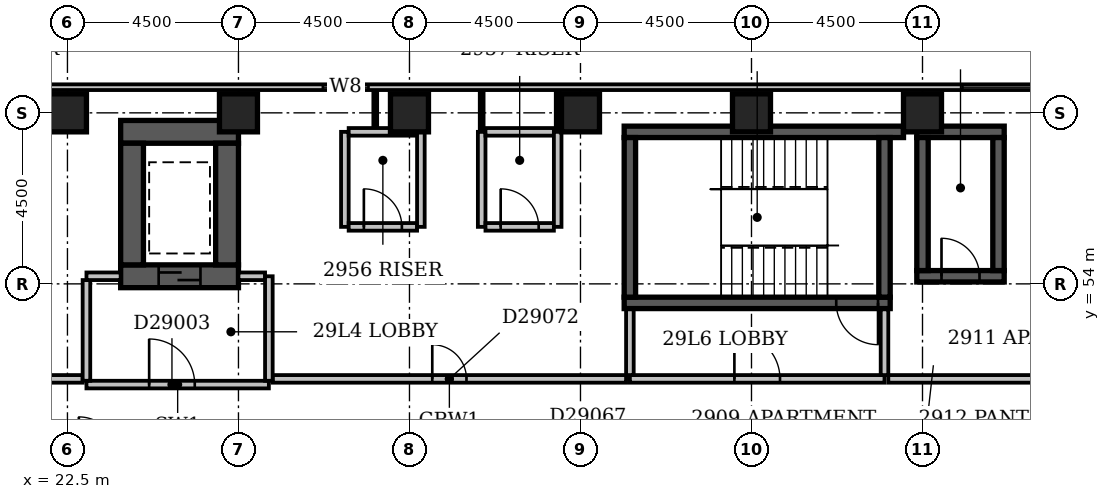
"""IFC4 building model, lengths in metres.
Left out: names, types, materials, properties, quantities, classifications, styles, units other than length and angle.
Written with IfcOpenShell. Run it as: python <this file> out.ifc"""

import sys

from ifc_helpers import new_model, si_unit, direction, frame, frame_2d, origin, origin_2d, place, context, subcontext, project, spatial, rectangle, extrude, element, fill, save


model = new_model("IFC4")
c1 = context("Model", 3, precision=1e-05, world=origin(), true_north=direction((0.0, 1.0)))
c2 = subcontext(c1, "Body", "Model", "MODEL_VIEW")
j1 = project(units=[si_unit("LENGTHUNIT", "METRE"), si_unit("PLANEANGLEUNIT", "RADIAN")], contexts=[c1])
p1 = place(None, origin())
s1 = spatial("IfcSite", under=j1, at=p1, CompositionType="ELEMENT")
p2 = place(p1, origin())
s2 = spatial("IfcBuilding", under=s1, at=p2, CompositionType="ELEMENT")
p3 = place(p2, frame((0.0, 0.0, 119.6)))
s3 = spatial("IfcBuildingStorey", under=s2, at=p3, CompositionType="ELEMENT", Elevation=119.6)
p4 = place(p3, frame((23.9, 54.2, -0.3), z_axis=(0.0, 0.0, 1.0), x_axis=(1.0, 0.0, 0.0)))
e1 = element("IfcWall", 1, at=p4, inside=s3, PredefinedType="SHEAR", context=c2, shape_type="SweptSolid", body=[
    extrude(rectangle(XDim=3.1, YDim=0.6, at=frame_2d((1.55, 0.0))), origin(), (0.0, 0.0, 1.0), 3.6),
])
p5 = place(p4, frame((1.0, 0.0, 0.3)))
e2 = element("IfcOpeningElement", 2, at=p5, cuts=e1, PredefinedType="OPENING", context=c2, shape_type="SweptSolid", body=[
    extrude(rectangle(XDim=1.1, YDim=2.1, at=frame_2d((0.55, 1.05))), frame((0.0, 0.312, 0.0), z_axis=(0.0, -1.0, 0.0), x_axis=(1.0, 0.0, 0.0)), (0.0, 0.0, 1.0), 0.624),
])
p6 = place(p3, frame((23.9, 58.0, -0.3), z_axis=(0.0, 0.0, 1.0), x_axis=(1.0, 0.0, 0.0)))
e3 = element("IfcWall", 3, at=p6, inside=s3, PredefinedType="SHEAR", context=c2, shape_type="SweptSolid", body=[
    extrude(rectangle(XDim=3.1, YDim=0.6, at=frame_2d((1.55, 0.0))), origin(), (0.0, 0.0, 1.0), 3.6),
])
for number, where, z_axis, x_axis in (
    (4, (24.2, 54.5, -0.3), (0.0, 0.0, 1.0), (0.0, 1.0, 0.0)),
    (5, (26.7, 54.5, -0.3), (0.0, 0.0, 1.0), (0.0, 1.0, 0.0)),
):
    element("IfcWall", number, at=place(p3, frame(where, z_axis=z_axis, x_axis=x_axis)), inside=s3, PredefinedType="SHEAR", context=c2, shape_type="SweptSolid", body=[
        extrude(rectangle(XDim=3.2, YDim=0.6, at=frame_2d((1.6, 0.0))), origin(), (0.0, 0.0, 1.0), 3.6),
    ])
p7 = place(p3, frame((37.15, 53.5, -0.3), z_axis=(0.0, 0.0, 1.0), x_axis=(1.0, 0.0, 0.0)))
e6 = element("IfcWall", 6, at=p7, inside=s3, PredefinedType="SHEAR", context=c2, shape_type="SweptSolid", body=[
    extrude(rectangle(XDim=7.0, YDim=0.3, at=frame_2d((3.5, 0.0))), origin(), (0.0, 0.0, 1.0), 3.6),
])
p8 = place(p7, frame((5.58, 0.0, 0.3)))
e7 = element("IfcOpeningElement", 7, at=p8, cuts=e6, PredefinedType="OPENING", context=c2, shape_type="SweptSolid", body=[
    extrude(rectangle(XDim=1.1, YDim=2.1, at=frame_2d((0.55, 1.05))), frame((0.0, 0.162, 0.0), z_axis=(0.0, -1.0, 0.0), x_axis=(1.0, 0.0, 0.0)), (0.0, 0.0, 1.0), 0.324),
])
p9 = place(p3, frame((37.15, 58.0, -0.3), z_axis=(0.0, 0.0, 1.0), x_axis=(1.0, 0.0, 0.0)))
e8 = element("IfcWall", 8, at=p9, inside=s3, PredefinedType="SHEAR", context=c2, shape_type="SweptSolid", body=[
    extrude(rectangle(XDim=7.35, YDim=0.3, at=frame_2d((3.675, 0.0))), origin(), (0.0, 0.0, 1.0), 3.6),
])
for number, where, z_axis, x_axis in (
    (9, (37.3, 53.65, -0.3), (0.0, 0.0, 1.0), (0.0, 1.0, 0.0)),
    (10, (44.0, 53.65, -0.3), (0.0, 0.0, 1.0), (0.0, 1.0, 0.0)),
):
    element("IfcWall", number, at=place(p3, frame(where, z_axis=z_axis, x_axis=x_axis)), inside=s3, PredefinedType="SHEAR", context=c2, shape_type="SweptSolid", body=[
        extrude(rectangle(XDim=4.2, YDim=0.3, at=frame_2d((2.1, 0.0))), origin(), (0.0, 0.0, 1.0), 3.6),
    ])
p10 = place(p3, frame((44.85, 54.2, -0.3), z_axis=(0.0, 0.0, 1.0), x_axis=(1.0, 0.0, 0.0)))
e11 = element("IfcWall", 11, at=p10, inside=s3, PredefinedType="SHEAR", context=c2, shape_type="SweptSolid", body=[
    extrude(rectangle(XDim=2.3, YDim=0.3, at=frame_2d((1.15, 0.0))), origin(), (0.0, 0.0, 1.0), 3.6),
])
p11 = place(p10, frame((0.65, 0.0, 0.3)))
e12 = element("IfcOpeningElement", 12, at=p11, cuts=e11, PredefinedType="OPENING", context=c2, shape_type="SweptSolid", body=[
    extrude(rectangle(XDim=1.0, YDim=2.1, at=frame_2d((0.5, 1.05))), frame((0.0, 0.162, 0.0), z_axis=(0.0, -1.0, 0.0), x_axis=(1.0, 0.0, 0.0)), (0.0, 0.0, 1.0), 0.324),
])
p12 = place(p3, frame((44.85, 58.0, -0.3), z_axis=(0.0, 0.0, 1.0), x_axis=(1.0, 0.0, 0.0)))
e13 = element("IfcWall", 13, at=p12, inside=s3, PredefinedType="SHEAR", context=c2, shape_type="SweptSolid", body=[
    extrude(rectangle(XDim=2.3, YDim=0.3, at=frame_2d((1.15, 0.0))), origin(), (0.0, 0.0, 1.0), 3.6),
])
for number, where, z_axis, x_axis in (
    (14, (45.0, 54.35, -0.3), (0.0, 0.0, 1.0), (0.0, 1.0, 0.0)),
    (15, (47.0, 54.35, -0.3), (0.0, 0.0, 1.0), (0.0, 1.0, 0.0)),
):
    element("IfcWall", number, at=place(p3, frame(where, z_axis=z_axis, x_axis=x_axis)), inside=s3, PredefinedType="SHEAR", context=c2, shape_type="SweptSolid", body=[
        extrude(rectangle(XDim=3.5, YDim=0.3, at=frame_2d((1.75, 0.0))), origin(), (0.0, 0.0, 1.0), 3.6),
    ])
for number, where, z_axis, x_axis in (
    (16, (22.5, 58.5, -0.3), (0.0, 0.0, 1.0), (1.0, 0.0, 0.0)),
    (17, (27.0, 58.5, -0.3), (0.0, 0.0, 1.0), (1.0, 0.0, 0.0)),
    (18, (31.5, 58.5, -0.3), (0.0, 0.0, 1.0), (1.0, 0.0, 0.0)),
    (19, (36.0, 58.5, -0.3), (0.0, 0.0, 1.0), (1.0, 0.0, 0.0)),
    (20, (40.5, 58.5, -0.3), (0.0, 0.0, 1.0), (1.0, 0.0, 0.0)),
    (21, (45.0, 58.5, -0.3), (0.0, 0.0, 1.0), (1.0, 0.0, 0.0)),
):
    element("IfcColumn", number, at=place(p3, frame(where, z_axis=z_axis, x_axis=x_axis)), inside=s3, PredefinedType="COLUMN", context=c2, shape_type="SweptSolid", body=[
        extrude(rectangle(XDim=1.0, YDim=1.0, at=origin_2d()), origin(), (0.0, 0.0, 1.0), 3.6),
    ])
p13 = place(p3, frame((68.1, 59.175, 0.0), z_axis=(0.0, 0.0, 1.0), x_axis=(-1.0, 0.0, 0.0)))
e22 = element("IfcWall", 22, at=p13, inside=s3, PredefinedType="STANDARD", context=c2, shape_type="SweptSolid", body=[
    extrude(rectangle(XDim=68.85, YDim=0.15, at=frame_2d((34.425, 0.0))), origin(), (0.0, 0.0, 1.0), 2.7),
])
p14 = place(p13, frame((1.65, 0.0, 0.6)))
e23 = element("IfcOpeningElement", 23, at=p14, cuts=e22, PredefinedType="OPENING", context=c2, shape_type="SweptSolid", body=[
    extrude(rectangle(XDim=2.4, YDim=1.8, at=frame_2d((1.2, 0.9))), frame((0.0, 0.087, 0.0), z_axis=(0.0, -1.0, 0.0), x_axis=(1.0, 0.0, 0.0)), (0.0, 0.0, 1.0), 0.174),
])
p15 = place(p13, frame((6.15, 0.0, 0.6)))
e24 = element("IfcOpeningElement", 24, at=p15, cuts=e22, PredefinedType="OPENING", context=c2, shape_type="SweptSolid", body=[
    extrude(rectangle(XDim=2.4, YDim=1.8, at=frame_2d((1.2, 0.9))), frame((0.0, 0.087, 0.0), z_axis=(0.0, -1.0, 0.0), x_axis=(1.0, 0.0, 0.0)), (0.0, 0.0, 1.0), 0.174),
])
p16 = place(p13, frame((16.347, 0.0, 0.6)))
e25 = element("IfcOpeningElement", 25, at=p16, cuts=e22, PredefinedType="OPENING", context=c2, shape_type="SweptSolid", body=[
    extrude(rectangle(XDim=1.5, YDim=1.8, at=frame_2d((0.75, 0.9))), frame((0.0, 0.087, 0.0), z_axis=(0.0, -1.0, 0.0), x_axis=(1.0, 0.0, 0.0)), (0.0, 0.0, 1.0), 0.174),
])
p17 = place(p13, frame((19.65, 0.0, 0.6)))
e26 = element("IfcOpeningElement", 26, at=p17, cuts=e22, PredefinedType="OPENING", context=c2, shape_type="SweptSolid", body=[
    extrude(rectangle(XDim=2.4, YDim=1.8, at=frame_2d((1.2, 0.9))), frame((0.0, 0.087, 0.0), z_axis=(0.0, -1.0, 0.0), x_axis=(1.0, 0.0, 0.0)), (0.0, 0.0, 1.0), 0.174),
])
p18 = place(p13, frame((37.678, 0.0, 0.6)))
e27 = element("IfcOpeningElement", 27, at=p18, cuts=e22, PredefinedType="OPENING", context=c2, shape_type="SweptSolid", body=[
    extrude(rectangle(XDim=1.2, YDim=1.8, at=frame_2d((0.6, 0.9))), frame((0.0, 0.087, 0.0), z_axis=(0.0, -1.0, 0.0), x_axis=(1.0, 0.0, 0.0)), (0.0, 0.0, 1.0), 0.174),
])
p19 = place(p3, frame((23.0, 51.35, 0.0), z_axis=(0.0, 0.0, 1.0), x_axis=(1.0, 0.0, 0.0)))
e28 = element("IfcWall", 28, at=p19, inside=s3, PredefinedType="PARTITIONING", context=c2, shape_type="SweptSolid", body=[
    extrude(rectangle(XDim=4.8, YDim=0.2, at=frame_2d((2.4, 0.0))), origin(), (0.0, 0.0, 1.0), 3.3),
])
p20 = place(p19, frame((1.65, 0.0, 0.0)))
e29 = element("IfcOpeningElement", 29, at=p20, cuts=e28, PredefinedType="OPENING", context=c2, shape_type="SweptSolid", body=[
    extrude(rectangle(XDim=1.2, YDim=2.1, at=frame_2d((0.6, 1.05))), frame((0.0, 0.112, 0.0), z_axis=(0.0, -1.0, 0.0), x_axis=(1.0, 0.0, 0.0)), (0.0, 0.0, 1.0), 0.224),
])
p21 = place(p3, frame((27.8, 51.45, 0.0), z_axis=(0.0, 0.0, 1.0), x_axis=(0.0, 1.0, 0.0)))
e30 = element("IfcWall", 30, at=p21, inside=s3, PredefinedType="PARTITIONING", context=c2, shape_type="SweptSolid", body=[
    extrude(rectangle(XDim=2.75, YDim=0.2, at=frame_2d((1.375, 0.0))), origin(), (0.0, 0.0, 1.0), 3.3),
])
p22 = place(p3, frame((23.0, 54.2, 0.0), z_axis=(0.0, 0.0, 1.0), x_axis=(1.0, 0.0, 0.0)))
e31 = element("IfcWall", 31, at=p22, inside=s3, PredefinedType="PARTITIONING", context=c2, shape_type="SweptSolid", body=[
    extrude(rectangle(XDim=0.9, YDim=0.2, at=frame_2d((0.45, 0.0))), origin(), (0.0, 0.0, 1.0), 3.3),
])
p23 = place(p3, frame((27.0, 54.2, 0.0), z_axis=(0.0, 0.0, 1.0), x_axis=(1.0, 0.0, 0.0)))
e32 = element("IfcWall", 32, at=p23, inside=s3, PredefinedType="PARTITIONING", context=c2, shape_type="SweptSolid", body=[
    extrude(rectangle(XDim=0.7, YDim=0.2, at=frame_2d((0.35, 0.0))), origin(), (0.0, 0.0, 1.0), 3.3),
])
p24 = place(p3, frame((23.0, 51.45, 0.0), z_axis=(0.0, 0.0, 1.0), x_axis=(0.0, 1.0, 0.0)))
e33 = element("IfcWall", 33, at=p24, inside=s3, PredefinedType="PARTITIONING", context=c2, shape_type="SweptSolid", body=[
    extrude(rectangle(XDim=2.65, YDim=0.2, at=frame_2d((1.325, 0.0))), origin(), (0.0, 0.0, 1.0), 3.3),
])
p25 = place(p3, frame((37.3, 51.5, 0.0), z_axis=(0.0, 0.0, 1.0), x_axis=(1.0, 0.0, 0.0)))
e34 = element("IfcWall", 34, at=p25, inside=s3, PredefinedType="PARTITIONING", context=c2, shape_type="SweptSolid", body=[
    extrude(rectangle(XDim=6.7, YDim=0.2, at=frame_2d((3.35, 0.0))), origin(), (0.0, 0.0, 1.0), 3.3),
])
p26 = place(p25, frame((2.75, 0.0, 0.0)))
e35 = element("IfcOpeningElement", 35, at=p26, cuts=e34, PredefinedType="OPENING", context=c2, shape_type="SweptSolid", body=[
    extrude(rectangle(XDim=1.2, YDim=2.1, at=frame_2d((0.6, 1.05))), frame((0.0, 0.112, 0.0), z_axis=(0.0, -1.0, 0.0), x_axis=(1.0, 0.0, 0.0)), (0.0, 0.0, 1.0), 0.224),
])
for number, where, z_axis, x_axis in (
    (36, (44.0, 51.6, 0.0), (0.0, 0.0, 1.0), (0.0, 1.0, 0.0)),
    (37, (37.3, 51.6, 0.0), (0.0, 0.0, 1.0), (0.0, 1.0, 0.0)),
):
    element("IfcWall", number, at=place(p3, frame(where, z_axis=z_axis, x_axis=x_axis)), inside=s3, PredefinedType="PARTITIONING", context=c2, shape_type="SweptSolid", body=[
        extrude(rectangle(XDim=1.73, YDim=0.2, at=frame_2d((0.865, 0.0))), origin(), (0.0, 0.0, 1.0), 3.3),
    ])
p27 = place(p3, frame((7.6, 51.5, 0.0), z_axis=(0.0, 0.0, 1.0), x_axis=(1.0, 0.0, 0.0)))
e38 = element("IfcWall", 38, at=p27, inside=s3, PredefinedType="PARTITIONING", context=c2, shape_type="SweptSolid", body=[
    extrude(rectangle(XDim=15.3, YDim=0.2, at=frame_2d((7.65, 0.0))), origin(), (0.0, 0.0, 1.0), 3.3),
])
p28 = place(p27, frame((7.2, 0.0, 0.0)))
e39 = element("IfcOpeningElement", 39, at=p28, cuts=e38, PredefinedType="OPENING", context=c2, shape_type="SweptSolid", body=[
    extrude(rectangle(XDim=0.9, YDim=2.1, at=frame_2d((0.45, 1.05))), frame((0.0, 0.112, 0.0), z_axis=(0.0, -1.0, 0.0), x_axis=(1.0, 0.0, 0.0)), (0.0, 0.0, 1.0), 0.224),
])
p29 = place(p3, frame((27.9, 51.5, 0.0), z_axis=(0.0, 0.0, 1.0), x_axis=(1.0, 0.0, 0.0)))
e40 = element("IfcWall", 40, at=p29, inside=s3, PredefinedType="PARTITIONING", context=c2, shape_type="SweptSolid", body=[
    extrude(rectangle(XDim=9.3, YDim=0.2, at=frame_2d((4.65, 0.0))), origin(), (0.0, 0.0, 1.0), 3.3),
])
p30 = place(p29, frame((4.2, 0.0, 0.0)))
e41 = element("IfcOpeningElement", 41, at=p30, cuts=e40, PredefinedType="OPENING", context=c2, shape_type="SweptSolid", body=[
    extrude(rectangle(XDim=0.9, YDim=2.1, at=frame_2d((0.45, 1.05))), frame((0.0, 0.112, 0.0), z_axis=(0.0, -1.0, 0.0), x_axis=(1.0, 0.0, 0.0)), (0.0, 0.0, 1.0), 0.224),
])
p31 = place(p3, frame((44.1, 51.5, 0.0), z_axis=(0.0, 0.0, 1.0), x_axis=(1.0, 0.0, 0.0)))
e42 = element("IfcWall", 42, at=p31, inside=s3, PredefinedType="PARTITIONING", context=c2, shape_type="SweptSolid", body=[
    extrude(rectangle(XDim=9.8, YDim=0.2, at=frame_2d((4.9, 0.0))), origin(), (0.0, 0.0, 1.0), 3.3),
])
p32 = place(p31, frame((4.45, 0.0, 0.0)))
e43 = element("IfcOpeningElement", 43, at=p32, cuts=e42, PredefinedType="OPENING", context=c2, shape_type="SweptSolid", body=[
    extrude(rectangle(XDim=0.9, YDim=2.1, at=frame_2d((0.45, 1.05))), frame((0.0, 0.112, 0.0), z_axis=(0.0, -1.0, 0.0), x_axis=(1.0, 0.0, 0.0)), (0.0, 0.0, 1.0), 0.224),
])
p33 = place(p3, frame((29.8, 55.5, 0.0), z_axis=(0.0, 0.0, 1.0), x_axis=(0.0, 1.0, 0.0)))
e44 = element("IfcWall", 44, at=p33, inside=s3, PredefinedType="PARTITIONING", context=c2, shape_type="SweptSolid", body=[
    extrude(rectangle(XDim=2.5, YDim=0.2, at=frame_2d((1.25, 0.0))), origin(), (0.0, 0.0, 1.0), 3.3),
])
p34 = place(p3, frame((29.9, 55.5, 0.0), z_axis=(0.0, 0.0, 1.0), x_axis=(1.0, 0.0, 0.0)))
e45 = element("IfcWall", 45, at=p34, inside=s3, PredefinedType="PARTITIONING", context=c2, shape_type="SweptSolid", body=[
    extrude(rectangle(XDim=1.8, YDim=0.2, at=frame_2d((0.9, 0.0))), origin(), (0.0, 0.0, 1.0), 3.3),
])
p35 = place(p34, frame((0.4, 0.0, 0.0)))
e46 = element("IfcOpeningElement", 46, at=p35, cuts=e45, PredefinedType="OPENING", context=c2, shape_type="SweptSolid", body=[
    extrude(rectangle(XDim=1.0, YDim=2.1, at=frame_2d((0.5, 1.05))), frame((0.0, 0.112, 0.0), z_axis=(0.0, -1.0, 0.0), x_axis=(1.0, 0.0, 0.0)), (0.0, 0.0, 1.0), 0.224),
])
for number, where, z_axis, x_axis in (
    (47, (31.8, 55.5, 0.0), (0.0, 0.0, 1.0), (0.0, 1.0, 0.0)),
    (48, (33.4, 55.5, 0.0), (0.0, 0.0, 1.0), (0.0, 1.0, 0.0)),
):
    element("IfcWall", number, at=place(p3, frame(where, z_axis=z_axis, x_axis=x_axis)), inside=s3, PredefinedType="PARTITIONING", context=c2, shape_type="SweptSolid", body=[
        extrude(rectangle(XDim=2.5, YDim=0.2, at=frame_2d((1.25, 0.0))), origin(), (0.0, 0.0, 1.0), 3.3),
    ])
p36 = place(p3, frame((33.5, 55.5, 0.0), z_axis=(0.0, 0.0, 1.0), x_axis=(1.0, 0.0, 0.0)))
e49 = element("IfcWall", 49, at=p36, inside=s3, PredefinedType="PARTITIONING", context=c2, shape_type="SweptSolid", body=[
    extrude(rectangle(XDim=1.8, YDim=0.2, at=frame_2d((0.9, 0.0))), origin(), (0.0, 0.0, 1.0), 3.3),
])
p37 = place(p36, frame((0.4, 0.0, 0.0)))
e50 = element("IfcOpeningElement", 50, at=p37, cuts=e49, PredefinedType="OPENING", context=c2, shape_type="SweptSolid", body=[
    extrude(rectangle(XDim=1.0, YDim=2.1, at=frame_2d((0.5, 1.05))), frame((0.0, 0.112, 0.0), z_axis=(0.0, -1.0, 0.0), x_axis=(1.0, 0.0, 0.0)), (0.0, 0.0, 1.0), 0.224),
])
p38 = place(p3, frame((35.4, 55.5, 0.0), z_axis=(0.0, 0.0, 1.0), x_axis=(0.0, 1.0, 0.0)))
e51 = element("IfcWall", 51, at=p38, inside=s3, PredefinedType="PARTITIONING", context=c2, shape_type="SweptSolid", body=[
    extrude(rectangle(XDim=2.5, YDim=0.2, at=frame_2d((1.25, 0.0))), origin(), (0.0, 0.0, 1.0), 2.4),
])
p39 = place(p3, frame((29.9, 58.0, 0.0), z_axis=(0.0, 0.0, 1.0), x_axis=(1.0, 0.0, 0.0)))
e52 = element("IfcWall", 52, at=p39, inside=s3, PredefinedType="PARTITIONING", context=c2, shape_type="SweptSolid", body=[
    extrude(rectangle(XDim=1.8, YDim=0.2, at=frame_2d((0.9, 0.0))), origin(), (0.0, 0.0, 1.0), 3.3),
])
p40 = place(p3, frame((33.4, 58.0, 0.0), z_axis=(0.0, 0.0, 1.0), x_axis=(0.0, 1.0, 0.0)))
e53 = element("IfcWall", 53, at=p40, inside=s3, PredefinedType="PARTITIONING", context=c2, shape_type="SweptSolid", body=[
    extrude(rectangle(XDim=1.1, YDim=0.1, at=frame_2d((0.55, 0.0))), origin(), (0.0, 0.0, 1.0), 3.3),
])
p41 = place(p3, frame((33.5, 58.0, 0.0), z_axis=(0.0, 0.0, 1.0), x_axis=(1.0, 0.0, 0.0)))
e54 = element("IfcWall", 54, at=p41, inside=s3, PredefinedType="PARTITIONING", context=c2, shape_type="SweptSolid", body=[
    extrude(rectangle(XDim=1.8, YDim=0.2, at=frame_2d((0.9, 0.0))), origin(), (0.0, 0.0, 1.0), 3.3),
])
p42 = place(p3, frame((35.4, 58.0, 0.0), z_axis=(0.0, 0.0, 1.0), x_axis=(0.0, 1.0, 0.0)))
e55 = element("IfcWall", 55, at=p42, inside=s3, PredefinedType="PARTITIONING", context=c2, shape_type="SweptSolid", body=[
    extrude(rectangle(XDim=1.1, YDim=0.1, at=frame_2d((0.55, 0.0))), origin(), (0.0, 0.0, 1.0), 2.4),
])
p43 = place(p3, frame((30.6, 58.1, 0.0), z_axis=(0.0, 0.0, 1.0), x_axis=(0.0, 1.0, 0.0)))
e56 = element("IfcWall", 56, at=p43, inside=s3, PredefinedType="PARTITIONING", context=c2, shape_type="SweptSolid", body=[
    extrude(rectangle(XDim=1.0, YDim=0.1, at=frame_2d((0.5, 0.0))), origin(), (0.0, 0.0, 1.0), 3.3),
])
p44 = place(p17, origin())
e57 = element("IfcWindow", 57, at=p44, inside=s3, PartitioningType="SINGLE_PANEL", PredefinedType="WINDOW", context=c2, shape_type="SweptSolid", body=[
    extrude(rectangle(XDim=2.4, YDim=1.8, at=frame_2d((1.2, 0.9))), frame((0.0, 0.03, 0.0), z_axis=(0.0, -1.0, 0.0), x_axis=(1.0, 0.0, 0.0)), (0.0, 0.0, 1.0), 0.06),
])
fill(e26, e57)
p45 = place(p18, origin())
e58 = element("IfcWindow", 58, at=p45, inside=s3, PartitioningType="SINGLE_PANEL", PredefinedType="WINDOW", context=c2, shape_type="SweptSolid", body=[
    extrude(rectangle(XDim=1.2, YDim=1.8, at=frame_2d((0.6, 0.9))), frame((0.0, 0.03, 0.0), z_axis=(0.0, -1.0, 0.0), x_axis=(1.0, 0.0, 0.0)), (0.0, 0.0, 1.0), 0.06),
])
fill(e27, e58)
p46 = place(p20, origin())
e59 = element("IfcDoor", 59, at=p46, inside=s3, OperationType="SINGLE_SWING_LEFT", PredefinedType="DOOR", context=c2, shape_type="SweptSolid", body=[
    extrude(rectangle(XDim=1.2, YDim=2.1, at=frame_2d((0.6, 1.05))), frame((0.0, 0.025, 0.0), z_axis=(0.0, -1.0, 0.0), x_axis=(1.0, 0.0, 0.0)), (0.0, 0.0, 1.0), 0.05),
])
fill(e29, e59)
p47 = place(p5, origin())
e60 = element("IfcDoor", 60, at=p47, inside=s3, OperationType="SLIDING_TO_LEFT", PredefinedType="DOOR", context=c2, shape_type="SweptSolid", body=[
    extrude(rectangle(XDim=1.1, YDim=2.1, at=frame_2d((0.55, 1.05))), frame((0.0, 0.025, 0.0), z_axis=(0.0, -1.0, 0.0), x_axis=(1.0, 0.0, 0.0)), (0.0, 0.0, 1.0), 0.05),
])
fill(e2, e60)
p48 = place(p26, origin())
e61 = element("IfcDoor", 61, at=p48, inside=s3, OperationType="SINGLE_SWING_LEFT", PredefinedType="DOOR", context=c2, shape_type="SweptSolid", body=[
    extrude(rectangle(XDim=1.2, YDim=2.1, at=frame_2d((0.6, 1.05))), frame((0.0, 0.025, 0.0), z_axis=(0.0, -1.0, 0.0), x_axis=(1.0, 0.0, 0.0)), (0.0, 0.0, 1.0), 0.05),
])
fill(e35, e61)
p49 = place(p11, origin())
e62 = element("IfcDoor", 62, at=p49, inside=s3, OperationType="SINGLE_SWING_LEFT", PredefinedType="DOOR", context=c2, shape_type="SweptSolid", body=[
    extrude(rectangle(XDim=1.0, YDim=2.1, at=frame_2d((0.5, 1.05))), frame((0.0, 0.025, 0.0), z_axis=(0.0, -1.0, 0.0), x_axis=(1.0, 0.0, 0.0)), (0.0, 0.0, 1.0), 0.05),
])
fill(e12, e62)
p50 = place(p8, origin())
e63 = element("IfcDoor", 63, at=p50, inside=s3, OperationType="SINGLE_SWING_RIGHT", PredefinedType="DOOR", context=c2, shape_type="SweptSolid", body=[
    extrude(rectangle(XDim=1.1, YDim=2.1, at=frame_2d((0.55, 1.05))), frame((0.0, 0.025, 0.0), z_axis=(0.0, -1.0, 0.0), x_axis=(1.0, 0.0, 0.0)), (0.0, 0.0, 1.0), 0.05),
])
fill(e7, e63)
p51 = place(p30, origin())
e64 = element("IfcDoor", 64, at=p51, inside=s3, OperationType="SINGLE_SWING_LEFT", PredefinedType="DOOR", context=c2, shape_type="SweptSolid", body=[
    extrude(rectangle(XDim=0.9, YDim=2.1, at=frame_2d((0.45, 1.05))), frame((0.0, 0.025, 0.0), z_axis=(0.0, -1.0, 0.0), x_axis=(1.0, 0.0, 0.0)), (0.0, 0.0, 1.0), 0.05),
])
fill(e41, e64)
p52 = place(p35, origin())
e65 = element("IfcDoor", 65, at=p52, inside=s3, OperationType="SINGLE_SWING_LEFT", PredefinedType="DOOR", context=c2, shape_type="SweptSolid", body=[
    extrude(rectangle(XDim=1.0, YDim=2.1, at=frame_2d((0.5, 1.05))), frame((0.0, 0.025, 0.0), z_axis=(0.0, -1.0, 0.0), x_axis=(1.0, 0.0, 0.0)), (0.0, 0.0, 1.0), 0.05),
])
fill(e46, e65)
p53 = place(p37, origin())
e66 = element("IfcDoor", 66, at=p53, inside=s3, OperationType="SINGLE_SWING_LEFT", PredefinedType="DOOR", context=c2, shape_type="SweptSolid", body=[
    extrude(rectangle(XDim=1.0, YDim=2.1, at=frame_2d((0.5, 1.05))), frame((0.0, 0.025, 0.0), z_axis=(0.0, -1.0, 0.0), x_axis=(1.0, 0.0, 0.0)), (0.0, 0.0, 1.0), 0.05),
])
fill(e50, e66)
save(model, sys.argv[1])
